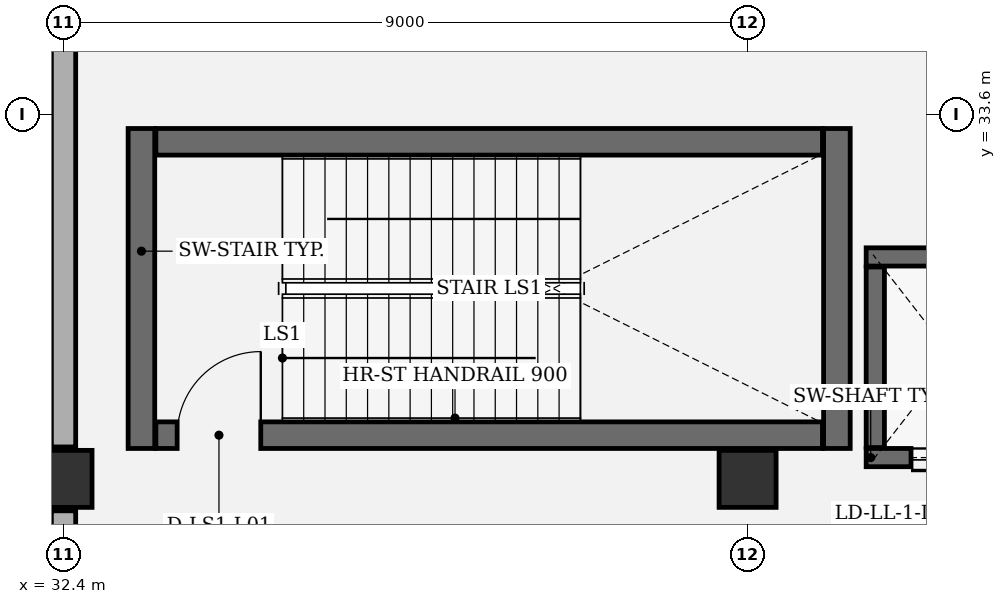
"""IFC4 building model, lengths in metres.
Left out: names, types, materials, properties, quantities, classifications, styles, units other than length and angle.
Written with IfcOpenShell. Run it as: python <this file> out.ifc"""

import sys

from ifc_helpers import new_model, si_unit, direction, frame, frame_2d, origin, origin_2d, place, context, subcontext, project, spatial, rectangle, extrude, element, fill, save


model = new_model("IFC4")
c1 = context("Model", 3, precision=1e-05, world=origin(), true_north=direction((0.0, 1.0)))
c2 = subcontext(c1, "Body", "Model", "MODEL_VIEW")
j1 = project(units=[si_unit("LENGTHUNIT", "METRE"), si_unit("PLANEANGLEUNIT", "RADIAN")], contexts=[c1])
p1 = place(None, origin())
s1 = spatial("IfcSite", under=j1, at=p1, CompositionType="ELEMENT")
p2 = place(p1, origin())
s2 = spatial("IfcBuilding", under=s1, at=p2, CompositionType="ELEMENT")
p3 = place(p2, frame((0.0, 0.0, 6.6)))
s3 = spatial("IfcBuildingStorey", under=s2, at=p3, CompositionType="ELEMENT", Elevation=6.6)
for number, where, z_axis, x_axis in (
    (1, (32.4, 28.8, 0.0), (0.0, 0.0, 1.0), (1.0, 0.0, 0.0)),
    (2, (41.4, 28.8, 0.0), (0.0, 0.0, 1.0), (1.0, 0.0, 0.0)),
):
    element("IfcColumn", number, at=place(p3, frame(where, z_axis=z_axis, x_axis=x_axis)), inside=s3, PredefinedType="COLUMN", context=c2, shape_type="SweptSolid", body=[
        extrude(rectangle(XDim=0.75, YDim=0.75, at=origin_2d()), origin(), (0.0, 0.0, 1.0), 5.4),
    ])
p4 = place(p3, frame((32.4, 19.62, 0.0), z_axis=(0.0, 0.0, 1.0), x_axis=(0.0, 1.0, 0.0)))
e3 = element("IfcWall", 3, at=p4, inside=s3, PredefinedType="SOLIDWALL", context=c2, shape_type="SweptSolid", body=[
    extrude(rectangle(XDim=8.76, YDim=0.32, at=frame_2d((4.38, 0.0))), origin(), (0.0, 0.0, 1.0), 4.337),
])
p5 = place(p3, frame((32.4, 29.22, 0.0), z_axis=(0.0, 0.0, 1.0), x_axis=(0.0, 1.0, 0.0)))
e4 = element("IfcWall", 4, at=p5, inside=s3, PredefinedType="SOLIDWALL", context=c2, shape_type="SweptSolid", body=[
    extrude(rectangle(XDim=8.76, YDim=0.32, at=frame_2d((4.38, 0.0))), origin(), (0.0, 0.0, 1.0), 4.337),
])
for number, where, z_axis, x_axis in (
    (5, (33.425, 33.41, 0.0), (0.0, 0.0, 1.0), (0.0, -1.0, 0.0)),
    (6, (42.575, 29.2, 0.0), (0.0, 0.0, 1.0), (0.0, 1.0, 0.0)),
):
    element("IfcWall", number, at=place(p3, frame(where, z_axis=z_axis, x_axis=x_axis)), inside=s3, PredefinedType="SHEAR", context=c2, shape_type="SweptSolid", body=[
        extrude(rectangle(XDim=4.21, YDim=0.35, at=frame_2d((2.105, 0.0))), origin(), (0.0, 0.0, 1.0), 5.395),
    ])
p6 = place(p3, frame((33.615, 29.375, 0.0), z_axis=(0.0, 0.0, 1.0), x_axis=(1.0, 0.0, 0.0)))
e7 = element("IfcWall", 7, at=p6, inside=s3, PredefinedType="SHEAR", context=c2, shape_type="SweptSolid", body=[
    extrude(rectangle(XDim=8.77, YDim=0.35, at=frame_2d((4.385, 0.0))), origin(), (0.0, 0.0, 1.0), 5.395),
])
p7 = place(p6, frame((0.28, 0.0, 0.0)))
e8 = element("IfcOpeningElement", 8, at=p7, cuts=e7, PredefinedType="OPENING", context=c2, shape_type="SweptSolid", body=[
    extrude(rectangle(XDim=1.1, YDim=2.2, at=frame_2d((0.55, 1.1))), frame((0.0, 0.185, 0.0), z_axis=(0.0, -1.0, 0.0), x_axis=(1.0, 0.0, 0.0)), (0.0, 0.0, 1.0), 0.37),
])
p8 = place(p3, frame((42.385, 33.235, 0.0), z_axis=(0.0, 0.0, 1.0), x_axis=(-1.0, 0.0, 0.0)))
e9 = element("IfcWall", 9, at=p8, inside=s3, PredefinedType="SHEAR", context=c2, shape_type="SweptSolid", body=[
    extrude(rectangle(XDim=8.77, YDim=0.35, at=frame_2d((4.385, 0.0))), origin(), (0.0, 0.0, 1.0), 5.395),
])
p9 = place(p3, frame((45.24, 29.08, 0.0), z_axis=(0.0, 0.0, 1.0), x_axis=(-1.0, 0.0, 0.0)))
e10 = element("IfcWall", 10, at=p9, inside=s3, PredefinedType="SHEAR", context=c2, shape_type="SweptSolid", body=[
    extrude(rectangle(XDim=2.28, YDim=0.24, at=frame_2d((1.14, 0.0))), origin(), (0.0, 0.0, 1.0), 5.14),
])
p10 = place(p9, frame((0.59, 0.0, 0.0)))
e11 = element("IfcOpeningElement", 11, at=p10, cuts=e10, PredefinedType="OPENING", context=c2, shape_type="SweptSolid", body=[
    extrude(rectangle(XDim=1.1, YDim=2.2, at=frame_2d((0.55, 1.1))), frame((0.0, 0.13, 0.0), z_axis=(0.0, -1.0, 0.0), x_axis=(1.0, 0.0, 0.0)), (0.0, 0.0, 1.0), 0.26),
])
p11 = place(p3, frame((42.96, 31.72, 0.0), z_axis=(0.0, 0.0, 1.0), x_axis=(1.0, 0.0, 0.0)))
e12 = element("IfcWall", 12, at=p11, inside=s3, PredefinedType="SHEAR", context=c2, shape_type="SweptSolid", body=[
    extrude(rectangle(XDim=2.28, YDim=0.24, at=frame_2d((1.14, 0.0))), origin(), (0.0, 0.0, 1.0), 5.14),
])
p12 = place(p3, frame((43.08, 29.212, 0.0), z_axis=(0.0, 0.0, 1.0), x_axis=(0.0, 1.0, 0.0)))
e13 = element("IfcWall", 13, at=p12, inside=s3, PredefinedType="SHEAR", context=c2, shape_type="SweptSolid", body=[
    extrude(rectangle(XDim=2.376, YDim=0.24, at=frame_2d((1.188, 0.0))), origin(), (0.0, 0.0, 1.0), 5.14),
])
p13 = place(p7, origin())
e14 = element("IfcDoor", 14, at=p13, inside=s3, OperationType="SINGLE_SWING_RIGHT", PredefinedType="DOOR", context=c2, shape_type="SweptSolid", body=[
    extrude(rectangle(XDim=1.1, YDim=2.2, at=frame_2d((0.55, 1.1))), frame((0.0, 0.025, 0.0), z_axis=(0.0, -1.0, 0.0), x_axis=(1.0, 0.0, 0.0)), (0.0, 0.0, 1.0), 0.05),
])
fill(e8, e14)
p14 = place(p10, origin())
e15 = element("IfcDoor", 15, at=p14, inside=s3, OperationType="DOUBLE_DOOR_SLIDING", PredefinedType="DOOR", context=c2, shape_type="SweptSolid", body=[
    extrude(rectangle(XDim=1.1, YDim=2.2, at=frame_2d((0.55, 1.1))), frame((0.0, 0.025, 0.0), z_axis=(0.0, -1.0, 0.0), x_axis=(1.0, 0.0, 0.0)), (0.0, 0.0, 1.0), 0.05),
])
fill(e11, e15)
save(model, sys.argv[1])
